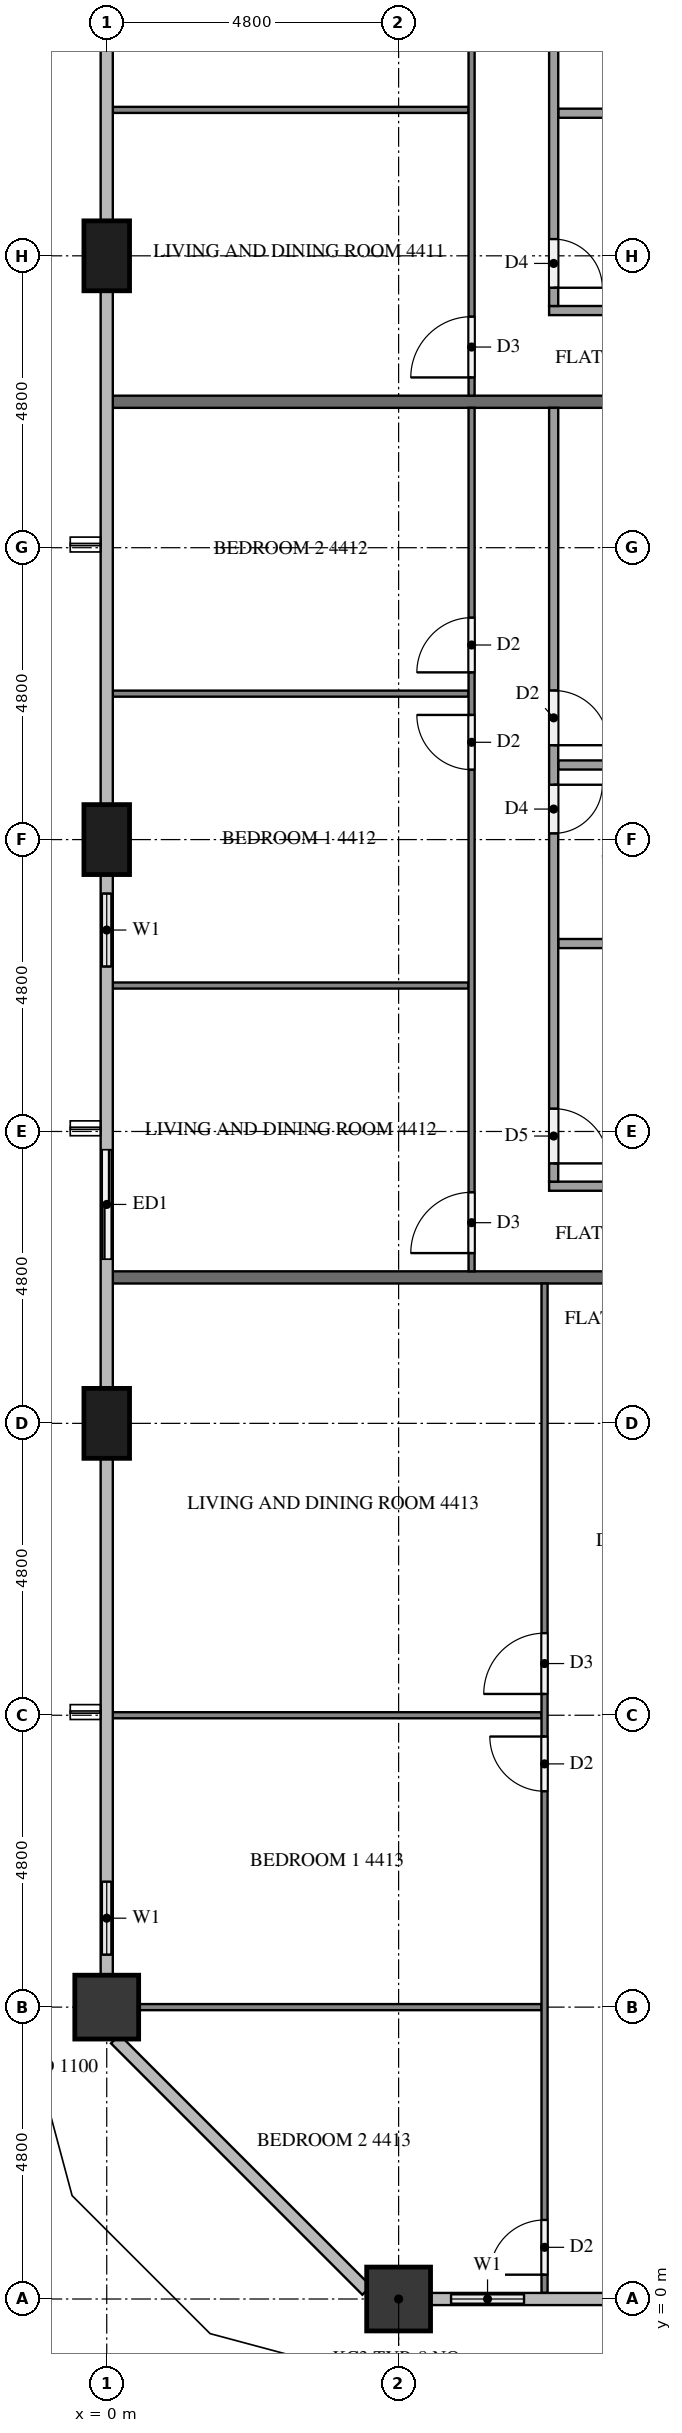
"""IFC4 building model, lengths in metres.
Left out: names, types, materials, properties, quantities, classifications, styles, units other than length and angle.
Written with IfcOpenShell. Run it as: python <this file> out.ifc"""

import sys

from ifc_helpers import new_model, si_unit, direction, frame, frame_2d, origin, origin_2d, place, context, subcontext, project, spatial, rectangle, extrude, element, fill, save


model = new_model("IFC4")
c1 = context("Model", 3, precision=1e-05, world=origin(), true_north=direction((0.0, 1.0)))
c2 = subcontext(c1, "Body", "Model", "MODEL_VIEW")
j1 = project(units=[si_unit("LENGTHUNIT", "METRE"), si_unit("PLANEANGLEUNIT", "RADIAN")], contexts=[c1])
p1 = place(None, origin())
s1 = spatial("IfcSite", under=j1, at=p1, CompositionType="ELEMENT")
p2 = place(p1, origin())
s2 = spatial("IfcBuilding", under=s1, at=p2, CompositionType="ELEMENT")
p3 = place(p2, frame((0.0, 0.0, 170.0)))
s3 = spatial("IfcBuildingStorey", under=s2, at=p3, CompositionType="ELEMENT", Elevation=170.0)
p4 = place(p3, frame((4.8, 0.0, 0.0), z_axis=(0.0, 0.0, 1.0), x_axis=(1.0, 0.0, 0.0)))
e1 = element("IfcColumn", 1, at=p4, inside=s3, PredefinedType="COLUMN", context=c2, shape_type="SweptSolid", body=[
    extrude(rectangle(XDim=1.05, YDim=1.05, at=origin_2d()), origin(), (0.0, 0.0, 1.0), 3.1),
])
for number, where, z_axis, x_axis in (
    (2, (0.0, 33.6, 0.0), (0.0, 0.0, 1.0), (0.0, 1.0, 0.0)),
    (3, (0.0, 24.0, 0.0), (0.0, 0.0, 1.0), (0.0, 1.0, 0.0)),
    (4, (0.0, 14.4, 0.0), (0.0, 0.0, 1.0), (0.0, 1.0, 0.0)),
):
    element("IfcColumn", number, at=place(p3, frame(where, z_axis=z_axis, x_axis=x_axis)), inside=s3, PredefinedType="COLUMN", context=c2, shape_type="SweptSolid", body=[
        extrude(rectangle(XDim=1.15, YDim=0.75, at=origin_2d()), origin(), (0.0, 0.0, 1.0), 3.1),
    ])
p5 = place(p3, frame((0.0, 4.8, 0.0), z_axis=(0.0, 0.0, 1.0), x_axis=(1.0, 0.0, 0.0)))
e5 = element("IfcColumn", 5, at=p5, inside=s3, PredefinedType="COLUMN", context=c2, shape_type="SweptSolid", body=[
    extrude(rectangle(XDim=1.05, YDim=1.05, at=origin_2d()), origin(), (0.0, 0.0, 1.0), 3.1),
])
p6 = place(p3, frame((5.325, 0.0, 0.0), z_axis=(0.0, 0.0, 1.0), x_axis=(1.0, 0.0, 0.0)))
e6 = element("IfcWall", 6, at=p6, inside=s3, PredefinedType="SOLIDWALL", context=c2, shape_type="SweptSolid", body=[
    extrude(rectangle(XDim=1.875, YDim=0.15, at=frame_2d((0.938, 0.0))), origin(), (0.0, 0.0, 1.0), 3.1),
])
p7 = place(p6, frame((0.337, 0.0, 0.9)))
e7 = element("IfcOpeningElement", 7, at=p7, cuts=e6, PredefinedType="OPENING", context=c2, shape_type="SweptSolid", body=[
    extrude(rectangle(XDim=1.2, YDim=1.4, at=frame_2d((0.6, 0.7))), frame((0.0, 0.085, 0.0), z_axis=(0.0, -1.0, 0.0), x_axis=(1.0, 0.0, 0.0)), (0.0, 0.0, 1.0), 0.17),
])
p8 = place(p3, frame((0.0, 23.425, 0.0), z_axis=(0.0, 0.0, 1.0), x_axis=(0.0, -1.0, 0.0)))
e8 = element("IfcWall", 8, at=p8, inside=s3, PredefinedType="SOLIDWALL", context=c2, shape_type="SweptSolid", body=[
    extrude(rectangle(XDim=1.825, YDim=0.15, at=frame_2d((0.913, 0.0))), origin(), (0.0, 0.0, 1.0), 3.1),
])
p9 = place(p8, frame((0.312, 0.0, 0.9)))
e9 = element("IfcOpeningElement", 9, at=p9, cuts=e8, PredefinedType="OPENING", context=c2, shape_type="SweptSolid", body=[
    extrude(rectangle(XDim=1.2, YDim=1.4, at=frame_2d((0.6, 0.7))), frame((0.0, 0.085, 0.0), z_axis=(0.0, -1.0, 0.0), x_axis=(1.0, 0.0, 0.0)), (0.0, 0.0, 1.0), 0.17),
])
p10 = place(p3, frame((0.0, 19.2, 0.0), z_axis=(0.0, 0.0, 1.0), x_axis=(0.0, -1.0, 0.0)))
e10 = element("IfcWall", 10, at=p10, inside=s3, PredefinedType="SOLIDWALL", context=c2, shape_type="SweptSolid", body=[
    extrude(rectangle(XDim=2.4, YDim=0.15, at=frame_2d((1.2, 0.0))), origin(), (0.0, 0.0, 1.0), 3.1),
])
p11 = place(p10, frame((0.3, 0.0, 0.0)))
e11 = element("IfcOpeningElement", 11, at=p11, cuts=e10, PredefinedType="OPENING", context=c2, shape_type="SweptSolid", body=[
    extrude(rectangle(XDim=1.8, YDim=2.4, at=frame_2d((0.9, 1.2))), frame((0.0, 0.085, 0.0), z_axis=(0.0, -1.0, 0.0), x_axis=(1.0, 0.0, 0.0)), (0.0, 0.0, 1.0), 0.17),
])
p12 = place(p3, frame((0.0, 7.2, 0.0), z_axis=(0.0, 0.0, 1.0), x_axis=(0.0, -1.0, 0.0)))
e12 = element("IfcWall", 12, at=p12, inside=s3, PredefinedType="SOLIDWALL", context=c2, shape_type="SweptSolid", body=[
    extrude(rectangle(XDim=1.875, YDim=0.15, at=frame_2d((0.938, 0.0))), origin(), (0.0, 0.0, 1.0), 3.1),
])
p13 = place(p12, frame((0.337, 0.0, 0.9)))
e13 = element("IfcOpeningElement", 13, at=p13, cuts=e12, PredefinedType="OPENING", context=c2, shape_type="SweptSolid", body=[
    extrude(rectangle(XDim=1.2, YDim=1.4, at=frame_2d((0.6, 0.7))), frame((0.0, 0.085, 0.0), z_axis=(0.0, -1.0, 0.0), x_axis=(1.0, 0.0, 0.0)), (0.0, 0.0, 1.0), 0.17),
])
for number, where, z_axis, x_axis in (
    (14, (0.1, 31.2, 0.0), (0.0, 0.0, 1.0), (1.0, 0.0, 0.0)),
    (15, (0.1, 16.8, 0.0), (0.0, 0.0, 1.0), (1.0, 0.0, 0.0)),
):
    element("IfcWall", number, at=place(p3, frame(where, z_axis=z_axis, x_axis=x_axis)), inside=s3, PredefinedType="PARTITIONING", context=c2, shape_type="SweptSolid", body=[
        extrude(rectangle(XDim=11.8, YDim=0.2, at=frame_2d((5.9, 0.0))), origin(), (0.0, 0.0, 1.0), 3.1),
    ])
p14 = place(p3, frame((5.95, 36.0, 0.0), z_axis=(0.0, 0.0, 1.0), x_axis=(-1.0, 0.0, 0.0)))
e16 = element("IfcWall", 16, at=p14, inside=s3, PredefinedType="PARTITIONING", context=c2, shape_type="SweptSolid", body=[
    extrude(rectangle(XDim=5.85, YDim=0.1, at=frame_2d((2.925, 0.0))), origin(), (0.0, 0.0, 1.0), 3.1),
])
p15 = place(p3, frame((6.0, 31.3, 0.0), z_axis=(0.0, 0.0, 1.0), x_axis=(0.0, 1.0, 0.0)))
e17 = element("IfcWall", 17, at=p15, inside=s3, PredefinedType="PARTITIONING", context=c2, shape_type="SweptSolid", body=[
    extrude(rectangle(XDim=9.4, YDim=0.1, at=frame_2d((4.7, 0.0))), origin(), (0.0, 0.0, 1.0), 3.1),
])
p16 = place(p15, frame((0.3, 0.0, 0.0)))
e18 = element("IfcOpeningElement", 18, at=p16, cuts=e17, PredefinedType="OPENING", context=c2, shape_type="SweptSolid", body=[
    extrude(rectangle(XDim=1.0, YDim=2.1, at=frame_2d((0.5, 1.05))), frame((0.0, 0.06, 0.0), z_axis=(0.0, -1.0, 0.0), x_axis=(1.0, 0.0, 0.0)), (0.0, 0.0, 1.0), 0.12),
])
p17 = place(p15, frame((8.2, 0.0, 0.0)))
e19 = element("IfcOpeningElement", 19, at=p17, cuts=e17, PredefinedType="OPENING", context=c2, shape_type="SweptSolid", body=[
    extrude(rectangle(XDim=0.9, YDim=2.1, at=frame_2d((0.45, 1.05))), frame((0.0, 0.06, 0.0), z_axis=(0.0, -1.0, 0.0), x_axis=(1.0, 0.0, 0.0)), (0.0, 0.0, 1.0), 0.12),
])
p18 = place(p3, frame((11.9, 35.945, 0.0), z_axis=(0.0, 0.0, 1.0), x_axis=(-1.0, 0.0, 0.0)))
e20 = element("IfcWall", 20, at=p18, inside=s3, PredefinedType="PARTITIONING", context=c2, shape_type="SweptSolid", body=[
    extrude(rectangle(XDim=4.475, YDim=0.15, at=frame_2d((2.237, 0.0))), origin(), (0.0, 0.0, 1.0), 3.1),
])
p19 = place(p3, frame((11.9, 32.7, 0.0), z_axis=(0.0, 0.0, 1.0), x_axis=(-1.0, 0.0, 0.0)))
e21 = element("IfcWall", 21, at=p19, inside=s3, PredefinedType="PARTITIONING", context=c2, shape_type="SweptSolid", body=[
    extrude(rectangle(XDim=4.625, YDim=0.15, at=frame_2d((2.312, 0.0))), origin(), (0.0, 0.0, 1.0), 3.1),
])
p20 = place(p3, frame((7.35, 40.7, 0.0), z_axis=(0.0, 0.0, 1.0), x_axis=(0.0, -1.0, 0.0)))
e22 = element("IfcWall", 22, at=p20, inside=s3, PredefinedType="PARTITIONING", context=c2, shape_type="SweptSolid", body=[
    extrude(rectangle(XDim=7.925, YDim=0.15, at=frame_2d((3.962, 0.0))), origin(), (0.0, 0.0, 1.0), 3.1),
])
p21 = place(p20, frame((6.825, 0.0, 0.0)))
e23 = element("IfcOpeningElement", 23, at=p21, cuts=e22, PredefinedType="OPENING", context=c2, shape_type="SweptSolid", body=[
    extrude(rectangle(XDim=0.8, YDim=2.1, at=frame_2d((0.4, 1.05))), frame((0.0, 0.085, 0.0), z_axis=(0.0, -1.0, 0.0), x_axis=(1.0, 0.0, 0.0)), (0.0, 0.0, 1.0), 0.17),
])
p22 = place(p20, frame((0.35, 0.0, 0.0)))
e24 = element("IfcOpeningElement", 24, at=p22, cuts=e22, PredefinedType="OPENING", context=c2, shape_type="SweptSolid", body=[
    extrude(rectangle(XDim=0.9, YDim=2.1, at=frame_2d((0.45, 1.05))), frame((0.0, 0.085, 0.0), z_axis=(0.0, -1.0, 0.0), x_axis=(1.0, 0.0, 0.0)), (0.0, 0.0, 1.0), 0.17),
])
for number, where, z_axis, x_axis in (
    (25, (5.95, 21.6, 0.0), (0.0, 0.0, 1.0), (-1.0, 0.0, 0.0)),
    (26, (5.95, 26.4, 0.0), (0.0, 0.0, 1.0), (-1.0, 0.0, 0.0)),
):
    element("IfcWall", number, at=place(p3, frame(where, z_axis=z_axis, x_axis=x_axis)), inside=s3, PredefinedType="PARTITIONING", context=c2, shape_type="SweptSolid", body=[
        extrude(rectangle(XDim=5.85, YDim=0.1, at=frame_2d((2.925, 0.0))), origin(), (0.0, 0.0, 1.0), 3.1),
    ])
p23 = place(p3, frame((6.0, 16.9, 0.0), z_axis=(0.0, 0.0, 1.0), x_axis=(0.0, 1.0, 0.0)))
e27 = element("IfcWall", 27, at=p23, inside=s3, PredefinedType="PARTITIONING", context=c2, shape_type="SweptSolid", body=[
    extrude(rectangle(XDim=14.2, YDim=0.1, at=frame_2d((7.1, 0.0))), origin(), (0.0, 0.0, 1.0), 3.1),
])
p24 = place(p23, frame((0.3, 0.0, 0.0)))
e28 = element("IfcOpeningElement", 28, at=p24, cuts=e27, PredefinedType="OPENING", context=c2, shape_type="SweptSolid", body=[
    extrude(rectangle(XDim=1.0, YDim=2.1, at=frame_2d((0.5, 1.05))), frame((0.0, 0.06, 0.0), z_axis=(0.0, -1.0, 0.0), x_axis=(1.0, 0.0, 0.0)), (0.0, 0.0, 1.0), 0.12),
])
p25 = place(p23, frame((8.25, 0.0, 0.0)))
e29 = element("IfcOpeningElement", 29, at=p25, cuts=e27, PredefinedType="OPENING", context=c2, shape_type="SweptSolid", body=[
    extrude(rectangle(XDim=0.9, YDim=2.1, at=frame_2d((0.45, 1.05))), frame((0.0, 0.06, 0.0), z_axis=(0.0, -1.0, 0.0), x_axis=(1.0, 0.0, 0.0)), (0.0, 0.0, 1.0), 0.12),
])
p26 = place(p23, frame((9.85, 0.0, 0.0)))
e30 = element("IfcOpeningElement", 30, at=p26, cuts=e27, PredefinedType="OPENING", context=c2, shape_type="SweptSolid", body=[
    extrude(rectangle(XDim=0.9, YDim=2.1, at=frame_2d((0.45, 1.05))), frame((0.0, 0.06, 0.0), z_axis=(0.0, -1.0, 0.0), x_axis=(1.0, 0.0, 0.0)), (0.0, 0.0, 1.0), 0.12),
])
for number, where, z_axis, x_axis in (
    (31, (11.9, 22.29, 0.0), (0.0, 0.0, 1.0), (-1.0, 0.0, 0.0)),
    (32, (11.9, 25.227, 0.0), (0.0, 0.0, 1.0), (-1.0, 0.0, 0.0)),
):
    element("IfcWall", number, at=place(p3, frame(where, z_axis=z_axis, x_axis=x_axis)), inside=s3, PredefinedType="PARTITIONING", context=c2, shape_type="SweptSolid", body=[
        extrude(rectangle(XDim=4.475, YDim=0.15, at=frame_2d((2.237, 0.0))), origin(), (0.0, 0.0, 1.0), 3.1),
    ])
p27 = place(p3, frame((11.9, 18.3, 0.0), z_axis=(0.0, 0.0, 1.0), x_axis=(-1.0, 0.0, 0.0)))
e33 = element("IfcWall", 33, at=p27, inside=s3, PredefinedType="PARTITIONING", context=c2, shape_type="SweptSolid", body=[
    extrude(rectangle(XDim=4.625, YDim=0.15, at=frame_2d((2.312, 0.0))), origin(), (0.0, 0.0, 1.0), 3.1),
])
p28 = place(p3, frame((7.35, 31.1, 0.0), z_axis=(0.0, 0.0, 1.0), x_axis=(0.0, -1.0, 0.0)))
e34 = element("IfcWall", 34, at=p28, inside=s3, PredefinedType="PARTITIONING", context=c2, shape_type="SweptSolid", body=[
    extrude(rectangle(XDim=12.725, YDim=0.15, at=frame_2d((6.363, 0.0))), origin(), (0.0, 0.0, 1.0), 3.1),
])
p29 = place(p28, frame((11.525, 0.0, 0.0)))
e35 = element("IfcOpeningElement", 35, at=p29, cuts=e34, PredefinedType="OPENING", context=c2, shape_type="SweptSolid", body=[
    extrude(rectangle(XDim=0.9, YDim=2.1, at=frame_2d((0.45, 1.05))), frame((0.0, 0.085, 0.0), z_axis=(0.0, -1.0, 0.0), x_axis=(1.0, 0.0, 0.0)), (0.0, 0.0, 1.0), 0.17),
])
p30 = place(p28, frame((6.198, 0.0, 0.0)))
e36 = element("IfcOpeningElement", 36, at=p30, cuts=e34, PredefinedType="OPENING", context=c2, shape_type="SweptSolid", body=[
    extrude(rectangle(XDim=0.8, YDim=2.1, at=frame_2d((0.4, 1.05))), frame((0.0, 0.085, 0.0), z_axis=(0.0, -1.0, 0.0), x_axis=(1.0, 0.0, 0.0)), (0.0, 0.0, 1.0), 0.17),
])
p31 = place(p28, frame((4.648, 0.0, 0.0)))
e37 = element("IfcOpeningElement", 37, at=p31, cuts=e34, PredefinedType="OPENING", context=c2, shape_type="SweptSolid", body=[
    extrude(rectangle(XDim=0.9, YDim=2.1, at=frame_2d((0.45, 1.05))), frame((0.0, 0.085, 0.0), z_axis=(0.0, -1.0, 0.0), x_axis=(1.0, 0.0, 0.0)), (0.0, 0.0, 1.0), 0.17),
])
p32 = place(p3, frame((7.15, 9.6, 0.0), z_axis=(0.0, 0.0, 1.0), x_axis=(-1.0, 0.0, 0.0)))
e38 = element("IfcWall", 38, at=p32, inside=s3, PredefinedType="PARTITIONING", context=c2, shape_type="SweptSolid", body=[
    extrude(rectangle(XDim=7.05, YDim=0.1, at=frame_2d((3.525, 0.0))), origin(), (0.0, 0.0, 1.0), 3.1),
])
p33 = place(p3, frame((7.15, 4.8, 0.0), z_axis=(0.0, 0.0, 1.0), x_axis=(-1.0, 0.0, 0.0)))
e39 = element("IfcWall", 39, at=p33, inside=s3, PredefinedType="PARTITIONING", context=c2, shape_type="SweptSolid", body=[
    extrude(rectangle(XDim=6.625, YDim=0.1, at=frame_2d((3.312, 0.0))), origin(), (0.0, 0.0, 1.0), 3.1),
])
p34 = place(p3, frame((7.2, 0.1, 0.0), z_axis=(0.0, 0.0, 1.0), x_axis=(0.0, 1.0, 0.0)))
e40 = element("IfcWall", 40, at=p34, inside=s3, PredefinedType="PARTITIONING", context=c2, shape_type="SweptSolid", body=[
    extrude(rectangle(XDim=16.6, YDim=0.1, at=frame_2d((8.3, 0.0))), origin(), (0.0, 0.0, 1.0), 3.1),
])
p35 = place(p34, frame((9.85, 0.0, 0.0)))
e41 = element("IfcOpeningElement", 41, at=p35, cuts=e40, PredefinedType="OPENING", context=c2, shape_type="SweptSolid", body=[
    extrude(rectangle(XDim=1.0, YDim=2.1, at=frame_2d((0.5, 1.05))), frame((0.0, 0.06, 0.0), z_axis=(0.0, -1.0, 0.0), x_axis=(1.0, 0.0, 0.0)), (0.0, 0.0, 1.0), 0.12),
])
p36 = place(p34, frame((8.25, 0.0, 0.0)))
e42 = element("IfcOpeningElement", 42, at=p36, cuts=e40, PredefinedType="OPENING", context=c2, shape_type="SweptSolid", body=[
    extrude(rectangle(XDim=0.9, YDim=2.1, at=frame_2d((0.45, 1.05))), frame((0.0, 0.06, 0.0), z_axis=(0.0, -1.0, 0.0), x_axis=(1.0, 0.0, 0.0)), (0.0, 0.0, 1.0), 0.12),
])
p37 = place(p34, frame((0.3, 0.0, 0.0)))
e43 = element("IfcOpeningElement", 43, at=p37, cuts=e40, PredefinedType="OPENING", context=c2, shape_type="SweptSolid", body=[
    extrude(rectangle(XDim=0.9, YDim=2.1, at=frame_2d((0.45, 1.05))), frame((0.0, 0.06, 0.0), z_axis=(0.0, -1.0, 0.0), x_axis=(1.0, 0.0, 0.0)), (0.0, 0.0, 1.0), 0.12),
])
p38 = place(p7, origin())
e44 = element("IfcWindow", 44, at=p38, inside=s3, PartitioningType="SINGLE_PANEL", PredefinedType="WINDOW", context=c2, shape_type="SweptSolid", body=[
    extrude(rectangle(XDim=1.2, YDim=1.4, at=frame_2d((0.6, 0.7))), frame((0.0, 0.03, 0.0), z_axis=(0.0, -1.0, 0.0), x_axis=(1.0, 0.0, 0.0)), (0.0, 0.0, 1.0), 0.06),
])
fill(e7, e44)
p39 = place(p9, origin())
e45 = element("IfcWindow", 45, at=p39, inside=s3, PartitioningType="SINGLE_PANEL", PredefinedType="WINDOW", context=c2, shape_type="SweptSolid", body=[
    extrude(rectangle(XDim=1.2, YDim=1.4, at=frame_2d((0.6, 0.7))), frame((0.0, 0.03, 0.0), z_axis=(0.0, -1.0, 0.0), x_axis=(1.0, 0.0, 0.0)), (0.0, 0.0, 1.0), 0.06),
])
fill(e9, e45)
p40 = place(p11, origin())
e46 = element("IfcDoor", 46, at=p40, inside=s3, OperationType="SLIDING_TO_LEFT", PredefinedType="DOOR", context=c2, shape_type="SweptSolid", body=[
    extrude(rectangle(XDim=1.8, YDim=2.4, at=frame_2d((0.9, 1.2))), frame((0.0, 0.025, 0.0), z_axis=(0.0, -1.0, 0.0), x_axis=(1.0, 0.0, 0.0)), (0.0, 0.0, 1.0), 0.05),
])
fill(e11, e46)
p41 = place(p13, origin())
e47 = element("IfcWindow", 47, at=p41, inside=s3, PartitioningType="SINGLE_PANEL", PredefinedType="WINDOW", context=c2, shape_type="SweptSolid", body=[
    extrude(rectangle(XDim=1.2, YDim=1.4, at=frame_2d((0.6, 0.7))), frame((0.0, 0.03, 0.0), z_axis=(0.0, -1.0, 0.0), x_axis=(1.0, 0.0, 0.0)), (0.0, 0.0, 1.0), 0.06),
])
fill(e13, e47)
p42 = place(p16, origin())
e48 = element("IfcDoor", 48, at=p42, inside=s3, OperationType="SINGLE_SWING_LEFT", PredefinedType="DOOR", context=c2, shape_type="SweptSolid", body=[
    extrude(rectangle(XDim=1.0, YDim=2.1, at=frame_2d((0.5, 1.05))), frame((0.0, 0.025, 0.0), z_axis=(0.0, -1.0, 0.0), x_axis=(1.0, 0.0, 0.0)), (0.0, 0.0, 1.0), 0.05),
])
fill(e18, e48)
p43 = place(p21, origin())
e49 = element("IfcDoor", 49, at=p43, inside=s3, OperationType="SINGLE_SWING_RIGHT", PredefinedType="DOOR", context=c2, shape_type="SweptSolid", body=[
    extrude(rectangle(XDim=0.8, YDim=2.1, at=frame_2d((0.4, 1.05))), frame((0.0, 0.025, 0.0), z_axis=(0.0, -1.0, 0.0), x_axis=(1.0, 0.0, 0.0)), (0.0, 0.0, 1.0), 0.05),
])
fill(e23, e49)
p44 = place(p24, origin())
e50 = element("IfcDoor", 50, at=p44, inside=s3, OperationType="SINGLE_SWING_LEFT", PredefinedType="DOOR", context=c2, shape_type="SweptSolid", body=[
    extrude(rectangle(XDim=1.0, YDim=2.1, at=frame_2d((0.5, 1.05))), frame((0.0, 0.025, 0.0), z_axis=(0.0, -1.0, 0.0), x_axis=(1.0, 0.0, 0.0)), (0.0, 0.0, 1.0), 0.05),
])
fill(e28, e50)
p45 = place(p25, origin())
e51 = element("IfcDoor", 51, at=p45, inside=s3, OperationType="SINGLE_SWING_RIGHT", PredefinedType="DOOR", context=c2, shape_type="SweptSolid", body=[
    extrude(rectangle(XDim=0.9, YDim=2.1, at=frame_2d((0.45, 1.05))), frame((0.0, 0.025, 0.0), z_axis=(0.0, -1.0, 0.0), x_axis=(1.0, 0.0, 0.0)), (0.0, 0.0, 1.0), 0.05),
])
fill(e29, e51)
p46 = place(p26, origin())
e52 = element("IfcDoor", 52, at=p46, inside=s3, OperationType="SINGLE_SWING_LEFT", PredefinedType="DOOR", context=c2, shape_type="SweptSolid", body=[
    extrude(rectangle(XDim=0.9, YDim=2.1, at=frame_2d((0.45, 1.05))), frame((0.0, 0.025, 0.0), z_axis=(0.0, -1.0, 0.0), x_axis=(1.0, 0.0, 0.0)), (0.0, 0.0, 1.0), 0.05),
])
fill(e30, e52)
p47 = place(p29, origin())
e53 = element("IfcDoor", 53, at=p47, inside=s3, OperationType="SINGLE_SWING_RIGHT", PredefinedType="DOOR", context=c2, shape_type="SweptSolid", body=[
    extrude(rectangle(XDim=0.9, YDim=2.1, at=frame_2d((0.45, 1.05))), frame((0.0, 0.025, 0.0), z_axis=(0.0, -1.0, 0.0), x_axis=(1.0, 0.0, 0.0)), (0.0, 0.0, 1.0), 0.05),
])
fill(e35, e53)
p48 = place(p30, origin())
e54 = element("IfcDoor", 54, at=p48, inside=s3, OperationType="SINGLE_SWING_LEFT", PredefinedType="DOOR", context=c2, shape_type="SweptSolid", body=[
    extrude(rectangle(XDim=0.8, YDim=2.1, at=frame_2d((0.4, 1.05))), frame((0.0, 0.025, 0.0), z_axis=(0.0, -1.0, 0.0), x_axis=(1.0, 0.0, 0.0)), (0.0, 0.0, 1.0), 0.05),
])
fill(e36, e54)
p49 = place(p31, origin())
e55 = element("IfcDoor", 55, at=p49, inside=s3, OperationType="SINGLE_SWING_RIGHT", PredefinedType="DOOR", context=c2, shape_type="SweptSolid", body=[
    extrude(rectangle(XDim=0.9, YDim=2.1, at=frame_2d((0.45, 1.05))), frame((0.0, 0.025, 0.0), z_axis=(0.0, -1.0, 0.0), x_axis=(1.0, 0.0, 0.0)), (0.0, 0.0, 1.0), 0.05),
])
fill(e37, e55)
p50 = place(p35, origin())
e56 = element("IfcDoor", 56, at=p50, inside=s3, OperationType="SINGLE_SWING_LEFT", PredefinedType="DOOR", context=c2, shape_type="SweptSolid", body=[
    extrude(rectangle(XDim=1.0, YDim=2.1, at=frame_2d((0.5, 1.05))), frame((0.0, 0.025, 0.0), z_axis=(0.0, -1.0, 0.0), x_axis=(1.0, 0.0, 0.0)), (0.0, 0.0, 1.0), 0.05),
])
fill(e41, e56)
p51 = place(p36, origin())
e57 = element("IfcDoor", 57, at=p51, inside=s3, OperationType="SINGLE_SWING_RIGHT", PredefinedType="DOOR", context=c2, shape_type="SweptSolid", body=[
    extrude(rectangle(XDim=0.9, YDim=2.1, at=frame_2d((0.45, 1.05))), frame((0.0, 0.025, 0.0), z_axis=(0.0, -1.0, 0.0), x_axis=(1.0, 0.0, 0.0)), (0.0, 0.0, 1.0), 0.05),
])
fill(e42, e57)
p52 = place(p37, origin())
e58 = element("IfcDoor", 58, at=p52, inside=s3, OperationType="SINGLE_SWING_LEFT", PredefinedType="DOOR", context=c2, shape_type="SweptSolid", body=[
    extrude(rectangle(XDim=0.9, YDim=2.1, at=frame_2d((0.45, 1.05))), frame((0.0, 0.025, 0.0), z_axis=(0.0, -1.0, 0.0), x_axis=(1.0, 0.0, 0.0)), (0.0, 0.0, 1.0), 0.05),
])
fill(e43, e58)
save(model, sys.argv[1])
